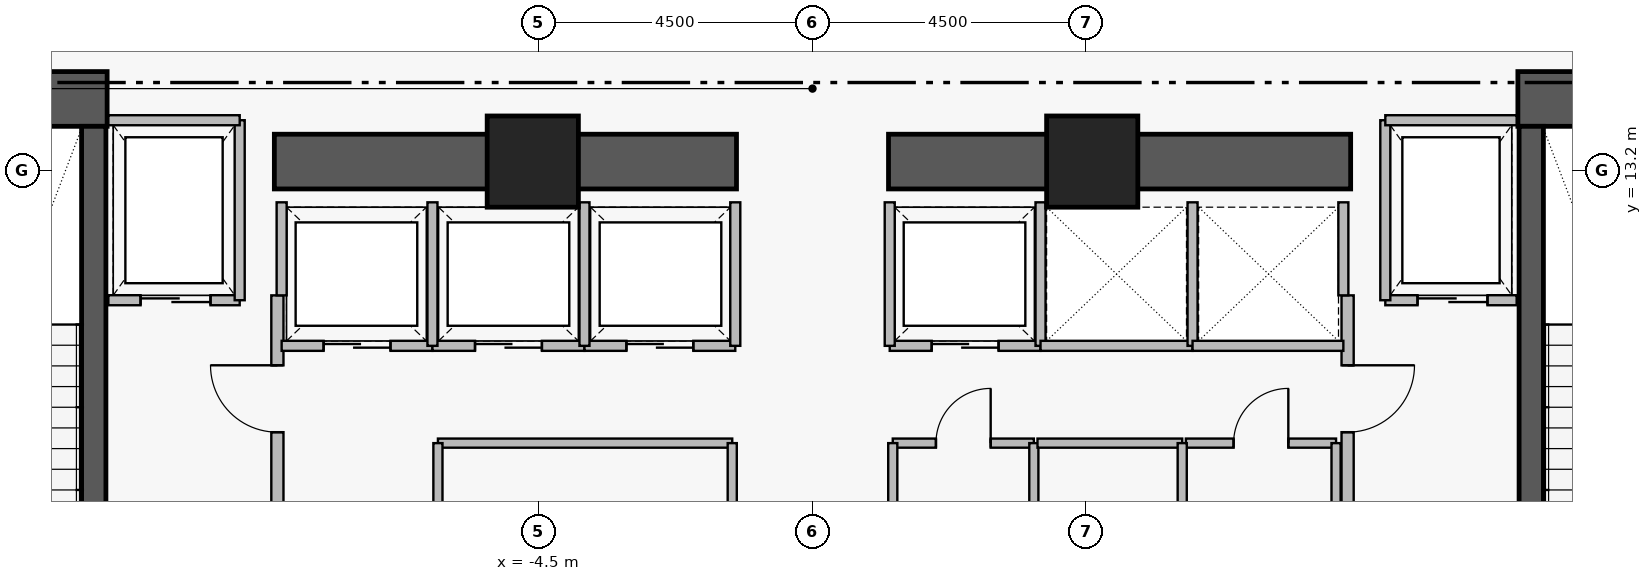
"""IFC4 building model, lengths in metres.
Left out: names, types, materials, properties, quantities, classifications, styles, units other than length and angle.
Written with IfcOpenShell. Run it as: python <this file> out.ifc"""

import sys

from ifc_helpers import new_model, si_unit, direction, frame, frame_2d, origin, origin_2d, place, context, subcontext, project, spatial, rectangle, extrude, element, fill, save


model = new_model("IFC4")
c1 = context("Model", 3, precision=1e-05, world=origin(), true_north=direction((0.0, 1.0)))
c2 = subcontext(c1, "Body", "Model", "MODEL_VIEW")
j1 = project(units=[si_unit("LENGTHUNIT", "METRE"), si_unit("PLANEANGLEUNIT", "RADIAN")], contexts=[c1])
p1 = place(None, origin())
s1 = spatial("IfcSite", under=j1, at=p1, CompositionType="ELEMENT")
p2 = place(p1, origin())
s2 = spatial("IfcBuilding", under=s1, at=p2, CompositionType="ELEMENT")
p3 = place(p2, frame((0.0, 0.0, 22.8)))
s3 = spatial("IfcBuildingStorey", under=s2, at=p3, CompositionType="ELEMENT", Elevation=22.8)
for number, where, z_axis, x_axis in (
    (1, (-16.31, 14.38, 0.0), (0.0, 0.0, 1.0), (1.0, 0.0, 0.0)),
    (2, (11.6, 14.38, 0.0), (0.0, 0.0, 1.0), (1.0, 0.0, 0.0)),
):
    element("IfcWall", number, at=place(p3, frame(where, z_axis=z_axis, x_axis=x_axis)), inside=s3, PredefinedType="SHEAR", context=c2, shape_type="SweptSolid", body=[
        extrude(rectangle(XDim=4.71, YDim=0.9, at=frame_2d((2.355, 0.0))), origin(), (0.0, 0.0, 1.0), 4.61),
    ])
for number, where, z_axis, x_axis in (
    (3, (-8.85, 13.35, 0.0), (0.0, 0.0, 1.0), (1.0, 0.0, 0.0)),
    (4, (1.25, 13.35, 0.0), (0.0, 0.0, 1.0), (1.0, 0.0, 0.0)),
):
    element("IfcWall", number, at=place(p3, frame(where, z_axis=z_axis, x_axis=x_axis)), inside=s3, PredefinedType="SHEAR", context=c2, shape_type="SweptSolid", body=[
        extrude(rectangle(XDim=7.6, YDim=0.9, at=frame_2d((3.8, 0.0))), origin(), (0.0, 0.0, 1.0), 4.58),
    ])
p4 = place(p3, frame((-11.82, 4.97, 0.0), z_axis=(0.0, 0.0, 1.0), x_axis=(0.0, 1.0, 0.0)))
e5 = element("IfcWall", 5, at=p4, inside=s3, PredefinedType="SHEAR", context=c2, shape_type="SweptSolid", body=[
    extrude(rectangle(XDim=8.96, YDim=0.4, at=frame_2d((4.48, 0.0))), origin(), (0.0, 0.0, 1.0), 4.61),
])
p5 = place(p4, frame((0.31, 0.0, 0.0)))
e6 = element("IfcOpeningElement", 6, at=p5, cuts=e5, PredefinedType="OPENING", context=c2, shape_type="SweptSolid", body=[
    extrude(rectangle(XDim=1.12, YDim=2.22, at=frame_2d((0.56, 1.11))), frame((0.0, 0.21, 0.0), z_axis=(0.0, -1.0, 0.0), x_axis=(1.0, 0.0, 0.0)), (0.0, 0.0, 1.0), 0.42),
])
p6 = place(p3, frame((11.82, 13.93, 0.0), z_axis=(0.0, 0.0, 1.0), x_axis=(0.0, -1.0, 0.0)))
e7 = element("IfcWall", 7, at=p6, inside=s3, PredefinedType="SHEAR", context=c2, shape_type="SweptSolid", body=[
    extrude(rectangle(XDim=8.96, YDim=0.4, at=frame_2d((4.48, 0.0))), origin(), (0.0, 0.0, 1.0), 4.61),
])
p7 = place(p6, frame((7.53, 0.0, 0.0)))
e8 = element("IfcOpeningElement", 8, at=p7, cuts=e7, PredefinedType="OPENING", context=c2, shape_type="SweptSolid", body=[
    extrude(rectangle(XDim=1.12, YDim=2.22, at=frame_2d((0.56, 1.11))), frame((0.0, 0.21, 0.0), z_axis=(0.0, -1.0, 0.0), x_axis=(1.0, 0.0, 0.0)), (0.0, 0.0, 1.0), 0.42),
])
for number, where, z_axis, x_axis in (
    (9, (-4.6, 13.35, 0.0), (0.0, 0.0, 1.0), (1.0, 0.0, 0.0)),
    (10, (4.6, 13.35, 0.0), (0.0, 0.0, 1.0), (1.0, 0.0, 0.0)),
):
    element("IfcColumn", number, at=place(p3, frame(where, z_axis=z_axis, x_axis=x_axis)), inside=s3, PredefinedType="COLUMN", context=c2, shape_type="SweptSolid", body=[
        extrude(rectangle(XDim=1.5, YDim=1.5, at=origin_2d()), origin(), (0.0, 0.0, 1.0), 4.8),
    ])
p8 = place(p3, frame((-8.8, 5.05, 0.0), z_axis=(0.0, 0.0, 1.0), x_axis=(0.0, 1.0, 0.0)))
e11 = element("IfcWall", 11, at=p8, inside=s3, PredefinedType="PARTITIONING", context=c2, shape_type="SweptSolid", body=[
    extrude(rectangle(XDim=6.1, YDim=0.2, at=frame_2d((3.05, 0.0))), origin(), (0.0, 0.0, 1.0), 4.58),
])
p9 = place(p8, frame((0.25, 0.0, 0.0)))
e12 = element("IfcOpeningElement", 12, at=p9, cuts=e11, PredefinedType="OPENING", context=c2, shape_type="SweptSolid", body=[
    extrude(rectangle(XDim=1.1, YDim=2.2, at=frame_2d((0.55, 1.1))), frame((0.0, 0.11, 0.0), z_axis=(0.0, -1.0, 0.0), x_axis=(1.0, 0.0, 0.0)), (0.0, 0.0, 1.0), 0.22),
])
p10 = place(p8, frame((3.85, 0.0, 0.0)))
e13 = element("IfcOpeningElement", 13, at=p10, cuts=e11, PredefinedType="OPENING", context=c2, shape_type="SweptSolid", body=[
    extrude(rectangle(XDim=1.1, YDim=2.2, at=frame_2d((0.55, 1.1))), frame((0.0, 0.11, 0.0), z_axis=(0.0, -1.0, 0.0), x_axis=(1.0, 0.0, 0.0)), (0.0, 0.0, 1.0), 0.22),
])
p11 = place(p3, frame((8.8, 11.15, 0.0), z_axis=(0.0, 0.0, 1.0), x_axis=(0.0, -1.0, 0.0)))
e14 = element("IfcWall", 14, at=p11, inside=s3, PredefinedType="PARTITIONING", context=c2, shape_type="SweptSolid", body=[
    extrude(rectangle(XDim=6.1, YDim=0.2, at=frame_2d((3.05, 0.0))), origin(), (0.0, 0.0, 1.0), 4.58),
])
p12 = place(p11, frame((1.15, 0.0, 0.0)))
e15 = element("IfcOpeningElement", 15, at=p12, cuts=e14, PredefinedType="OPENING", context=c2, shape_type="SweptSolid", body=[
    extrude(rectangle(XDim=1.1, YDim=2.2, at=frame_2d((0.55, 1.1))), frame((0.0, 0.11, 0.0), z_axis=(0.0, -1.0, 0.0), x_axis=(1.0, 0.0, 0.0)), (0.0, 0.0, 1.0), 0.22),
])
p13 = place(p11, frame((4.75, 0.0, 0.0)))
e16 = element("IfcOpeningElement", 16, at=p13, cuts=e14, PredefinedType="OPENING", context=c2, shape_type="SweptSolid", body=[
    extrude(rectangle(XDim=1.1, YDim=2.2, at=frame_2d((0.55, 1.1))), frame((0.0, 0.11, 0.0), z_axis=(0.0, -1.0, 0.0), x_axis=(1.0, 0.0, 0.0)), (0.0, 0.0, 1.0), 0.22),
])
p14 = place(p3, frame((-11.58, 11.07, 0.0), z_axis=(0.0, 0.0, 1.0), x_axis=(1.0, 0.0, 0.0)))
e17 = element("IfcWall", 17, at=p14, inside=s3, PredefinedType="PARTITIONING", context=c2, shape_type="SweptSolid", body=[
    extrude(rectangle(XDim=2.16, YDim=0.165, at=frame_2d((1.08, 0.0))), origin(), (0.0, 0.0, 1.0), 4.58),
])
p15 = place(p14, frame((0.53, 0.0, 0.0)))
e18 = element("IfcOpeningElement", 18, at=p15, cuts=e17, PredefinedType="OPENING", context=c2, shape_type="SweptSolid", body=[
    extrude(rectangle(XDim=1.15, YDim=2.25, at=frame_2d((0.575, 1.125))), frame((0.0, 0.093, 0.0), z_axis=(0.0, -1.0, 0.0), x_axis=(1.0, 0.0, 0.0)), (0.0, 0.0, 1.0), 0.185),
])
p16 = place(p3, frame((9.42, 11.07, 0.0), z_axis=(0.0, 0.0, 1.0), x_axis=(1.0, 0.0, 0.0)))
e19 = element("IfcWall", 19, at=p16, inside=s3, PredefinedType="PARTITIONING", context=c2, shape_type="SweptSolid", body=[
    extrude(rectangle(XDim=2.16, YDim=0.165, at=frame_2d((1.08, 0.0))), origin(), (0.0, 0.0, 1.0), 4.58),
])
p17 = place(p16, frame((0.53, 0.0, 0.0)))
e20 = element("IfcOpeningElement", 20, at=p17, cuts=e19, PredefinedType="OPENING", context=c2, shape_type="SweptSolid", body=[
    extrude(rectangle(XDim=1.15, YDim=2.25, at=frame_2d((0.575, 1.125))), frame((0.0, 0.093, 0.0), z_axis=(0.0, -1.0, 0.0), x_axis=(1.0, 0.0, 0.0)), (0.0, 0.0, 1.0), 0.185),
])
p18 = place(p3, frame((-8.73, 10.32, 0.0), z_axis=(0.0, 0.0, 1.0), x_axis=(1.0, 0.0, 0.0)))
e21 = element("IfcWall", 21, at=p18, inside=s3, PredefinedType="PARTITIONING", context=c2, shape_type="SweptSolid", body=[
    extrude(rectangle(XDim=2.48, YDim=0.165, at=frame_2d((1.24, 0.0))), origin(), (0.0, 0.0, 1.0), 4.58),
])
p19 = place(p18, frame((0.69, 0.0, 0.0)))
e22 = element("IfcOpeningElement", 22, at=p19, cuts=e21, PredefinedType="OPENING", context=c2, shape_type="SweptSolid", body=[
    extrude(rectangle(XDim=1.1, YDim=2.25, at=frame_2d((0.55, 1.125))), frame((0.0, 0.093, 0.0), z_axis=(0.0, -1.0, 0.0), x_axis=(1.0, 0.0, 0.0)), (0.0, 0.0, 1.0), 0.185),
])
p20 = place(p3, frame((-6.25, 10.32, 0.0), z_axis=(0.0, 0.0, 1.0), x_axis=(1.0, 0.0, 0.0)))
e23 = element("IfcWall", 23, at=p20, inside=s3, PredefinedType="PARTITIONING", context=c2, shape_type="SweptSolid", body=[
    extrude(rectangle(XDim=2.5, YDim=0.165, at=frame_2d((1.25, 0.0))), origin(), (0.0, 0.0, 1.0), 4.58),
])
p21 = place(p20, frame((0.7, 0.0, 0.0)))
e24 = element("IfcOpeningElement", 24, at=p21, cuts=e23, PredefinedType="OPENING", context=c2, shape_type="SweptSolid", body=[
    extrude(rectangle(XDim=1.1, YDim=2.25, at=frame_2d((0.55, 1.125))), frame((0.0, 0.093, 0.0), z_axis=(0.0, -1.0, 0.0), x_axis=(1.0, 0.0, 0.0)), (0.0, 0.0, 1.0), 0.185),
])
p22 = place(p3, frame((-3.75, 10.32, 0.0), z_axis=(0.0, 0.0, 1.0), x_axis=(1.0, 0.0, 0.0)))
e25 = element("IfcWall", 25, at=p22, inside=s3, PredefinedType="PARTITIONING", context=c2, shape_type="SweptSolid", body=[
    extrude(rectangle(XDim=2.48, YDim=0.165, at=frame_2d((1.24, 0.0))), origin(), (0.0, 0.0, 1.0), 4.58),
])
p23 = place(p22, frame((0.69, 0.0, 0.0)))
e26 = element("IfcOpeningElement", 26, at=p23, cuts=e25, PredefinedType="OPENING", context=c2, shape_type="SweptSolid", body=[
    extrude(rectangle(XDim=1.1, YDim=2.25, at=frame_2d((0.55, 1.125))), frame((0.0, 0.093, 0.0), z_axis=(0.0, -1.0, 0.0), x_axis=(1.0, 0.0, 0.0)), (0.0, 0.0, 1.0), 0.185),
])
p24 = place(p3, frame((1.27, 10.32, 0.0), z_axis=(0.0, 0.0, 1.0), x_axis=(1.0, 0.0, 0.0)))
e27 = element("IfcWall", 27, at=p24, inside=s3, PredefinedType="PARTITIONING", context=c2, shape_type="SweptSolid", body=[
    extrude(rectangle(XDim=2.48, YDim=0.165, at=frame_2d((1.24, 0.0))), origin(), (0.0, 0.0, 1.0), 4.58),
])
p25 = place(p24, frame((0.69, 0.0, 0.0)))
e28 = element("IfcOpeningElement", 28, at=p25, cuts=e27, PredefinedType="OPENING", context=c2, shape_type="SweptSolid", body=[
    extrude(rectangle(XDim=1.1, YDim=2.25, at=frame_2d((0.55, 1.125))), frame((0.0, 0.093, 0.0), z_axis=(0.0, -1.0, 0.0), x_axis=(1.0, 0.0, 0.0)), (0.0, 0.0, 1.0), 0.185),
])
p26 = place(p3, frame((1.32, 8.72, 0.0), z_axis=(0.0, 0.0, 1.0), x_axis=(1.0, 0.0, 0.0)))
e29 = element("IfcWall", 29, at=p26, inside=s3, PredefinedType="PARTITIONING", context=c2, shape_type="SweptSolid", body=[
    extrude(rectangle(XDim=2.32, YDim=0.15, at=frame_2d((1.16, 0.0))), origin(), (0.0, 0.0, 1.0), 4.58),
])
p27 = place(p26, frame((0.71, 0.0, 0.0)))
e30 = element("IfcOpeningElement", 30, at=p27, cuts=e29, PredefinedType="OPENING", context=c2, shape_type="SweptSolid", body=[
    extrude(rectangle(XDim=0.9, YDim=2.15, at=frame_2d((0.45, 1.075))), frame((0.0, 0.085, 0.0), z_axis=(0.0, -1.0, 0.0), x_axis=(1.0, 0.0, 0.0)), (0.0, 0.0, 1.0), 0.17),
])
p28 = place(p3, frame((6.14, 8.72, 0.0), z_axis=(0.0, 0.0, 1.0), x_axis=(1.0, 0.0, 0.0)))
e31 = element("IfcWall", 31, at=p28, inside=s3, PredefinedType="PARTITIONING", context=c2, shape_type="SweptSolid", body=[
    extrude(rectangle(XDim=2.47, YDim=0.15, at=frame_2d((1.235, 0.0))), origin(), (0.0, 0.0, 1.0), 4.58),
])
p29 = place(p28, frame((0.785, 0.0, 0.0)))
e32 = element("IfcOpeningElement", 32, at=p29, cuts=e31, PredefinedType="OPENING", context=c2, shape_type="SweptSolid", body=[
    extrude(rectangle(XDim=0.9, YDim=2.15, at=frame_2d((0.45, 1.075))), frame((0.0, 0.085, 0.0), z_axis=(0.0, -1.0, 0.0), x_axis=(1.0, 0.0, 0.0)), (0.0, 0.0, 1.0), 0.17),
])
p30 = place(p3, frame((-9.42, 11.07, 0.0), z_axis=(0.0, 0.0, 1.0), x_axis=(0.0, 1.0, 0.0)))
e33 = element("IfcWall", 33, at=p30, inside=s3, PredefinedType="PARTITIONING", context=c2, shape_type="SweptSolid", body=[
    extrude(rectangle(XDim=2.96, YDim=0.165, at=frame_2d((1.48, 0.0))), origin(), (0.0, 0.0, 1.0), 4.58),
])
p31 = place(p3, frame((-11.58, 14.03, 0.0), z_axis=(0.0, 0.0, 1.0), x_axis=(1.0, 0.0, 0.0)))
e34 = element("IfcWall", 34, at=p31, inside=s3, PredefinedType="PARTITIONING", context=c2, shape_type="SweptSolid", body=[
    extrude(rectangle(XDim=2.16, YDim=0.165, at=frame_2d((1.08, 0.0))), origin(), (0.0, 0.0, 1.0), 4.58),
])
p32 = place(p3, frame((9.42, 11.07, 0.0), z_axis=(0.0, 0.0, 1.0), x_axis=(0.0, 1.0, 0.0)))
e35 = element("IfcWall", 35, at=p32, inside=s3, PredefinedType="PARTITIONING", context=c2, shape_type="SweptSolid", body=[
    extrude(rectangle(XDim=2.96, YDim=0.165, at=frame_2d((1.48, 0.0))), origin(), (0.0, 0.0, 1.0), 4.58),
])
p33 = place(p3, frame((9.42, 14.03, 0.0), z_axis=(0.0, 0.0, 1.0), x_axis=(1.0, 0.0, 0.0)))
e36 = element("IfcWall", 36, at=p33, inside=s3, PredefinedType="PARTITIONING", context=c2, shape_type="SweptSolid", body=[
    extrude(rectangle(XDim=2.16, YDim=0.165, at=frame_2d((1.08, 0.0))), origin(), (0.0, 0.0, 1.0), 4.58),
])
p34 = place(p3, frame((-8.73, 11.15, 0.0), z_axis=(0.0, 0.0, 1.0), x_axis=(0.0, 1.0, 0.0)))
e37 = element("IfcWall", 37, at=p34, inside=s3, PredefinedType="PARTITIONING", context=c2, shape_type="SweptSolid", body=[
    extrude(rectangle(XDim=1.53, YDim=0.165, at=frame_2d((0.765, 0.0))), origin(), (0.0, 0.0, 1.0), 4.58),
])
for number, where, z_axis, x_axis in (
    (38, (-6.25, 10.32, 0.0), (0.0, 0.0, 1.0), (0.0, 1.0, 0.0)),
    (39, (-3.75, 10.32, 0.0), (0.0, 0.0, 1.0), (0.0, 1.0, 0.0)),
    (40, (-1.27, 10.32, 0.0), (0.0, 0.0, 1.0), (0.0, 1.0, 0.0)),
    (41, (1.27, 10.32, 0.0), (0.0, 0.0, 1.0), (0.0, 1.0, 0.0)),
    (42, (3.75, 10.32, 0.0), (0.0, 0.0, 1.0), (0.0, 1.0, 0.0)),
):
    element("IfcWall", number, at=place(p3, frame(where, z_axis=z_axis, x_axis=x_axis)), inside=s3, PredefinedType="PARTITIONING", context=c2, shape_type="SweptSolid", body=[
        extrude(rectangle(XDim=2.36, YDim=0.165, at=frame_2d((1.18, 0.0))), origin(), (0.0, 0.0, 1.0), 4.58),
    ])
p35 = place(p3, frame((3.75, 10.32, 0.0), z_axis=(0.0, 0.0, 1.0), x_axis=(1.0, 0.0, 0.0)))
e43 = element("IfcWall", 43, at=p35, inside=s3, PredefinedType="PARTITIONING", context=c2, shape_type="SweptSolid", body=[
    extrude(rectangle(XDim=2.5, YDim=0.165, at=frame_2d((1.25, 0.0))), origin(), (0.0, 0.0, 1.0), 4.58),
])
p36 = place(p3, frame((6.25, 10.32, 0.0), z_axis=(0.0, 0.0, 1.0), x_axis=(0.0, 1.0, 0.0)))
e44 = element("IfcWall", 44, at=p36, inside=s3, PredefinedType="PARTITIONING", context=c2, shape_type="SweptSolid", body=[
    extrude(rectangle(XDim=2.36, YDim=0.165, at=frame_2d((1.18, 0.0))), origin(), (0.0, 0.0, 1.0), 4.58),
])
p37 = place(p3, frame((6.25, 10.32, 0.0), z_axis=(0.0, 0.0, 1.0), x_axis=(1.0, 0.0, 0.0)))
e45 = element("IfcWall", 45, at=p37, inside=s3, PredefinedType="PARTITIONING", context=c2, shape_type="SweptSolid", body=[
    extrude(rectangle(XDim=2.48, YDim=0.165, at=frame_2d((1.24, 0.0))), origin(), (0.0, 0.0, 1.0), 4.58),
])
p38 = place(p3, frame((8.73, 11.15, 0.0), z_axis=(0.0, 0.0, 1.0), x_axis=(0.0, 1.0, 0.0)))
e46 = element("IfcWall", 46, at=p38, inside=s3, PredefinedType="PARTITIONING", context=c2, shape_type="SweptSolid", body=[
    extrude(rectangle(XDim=1.53, YDim=0.165, at=frame_2d((0.765, 0.0))), origin(), (0.0, 0.0, 1.0), 4.58),
])
p39 = place(p3, frame((-6.16, 8.72, 0.0), z_axis=(0.0, 0.0, 1.0), x_axis=(1.0, 0.0, 0.0)))
e47 = element("IfcWall", 47, at=p39, inside=s3, PredefinedType="PARTITIONING", context=c2, shape_type="SweptSolid", body=[
    extrude(rectangle(XDim=4.84, YDim=0.15, at=frame_2d((2.42, 0.0))), origin(), (0.0, 0.0, 1.0), 4.58),
])
for number, where, z_axis, x_axis in (
    (48, (-6.16, 6.48, 0.0), (0.0, 0.0, 1.0), (0.0, 1.0, 0.0)),
    (49, (-1.32, 6.48, 0.0), (0.0, 0.0, 1.0), (0.0, 1.0, 0.0)),
    (50, (1.32, 6.48, 0.0), (0.0, 0.0, 1.0), (0.0, 1.0, 0.0)),
    (51, (3.64, 6.48, 0.0), (0.0, 0.0, 1.0), (0.0, 1.0, 0.0)),
):
    element("IfcWall", number, at=place(p3, frame(where, z_axis=z_axis, x_axis=x_axis)), inside=s3, PredefinedType="PARTITIONING", context=c2, shape_type="SweptSolid", body=[
        extrude(rectangle(XDim=2.24, YDim=0.15, at=frame_2d((1.12, 0.0))), origin(), (0.0, 0.0, 1.0), 4.58),
    ])
p40 = place(p3, frame((3.7, 8.72, 0.0), z_axis=(0.0, 0.0, 1.0), x_axis=(1.0, 0.0, 0.0)))
e52 = element("IfcWall", 52, at=p40, inside=s3, PredefinedType="PARTITIONING", context=c2, shape_type="SweptSolid", body=[
    extrude(rectangle(XDim=2.38, YDim=0.15, at=frame_2d((1.19, 0.0))), origin(), (0.0, 0.0, 1.0), 4.58),
])
for number, where, z_axis, x_axis in (
    (53, (6.08, 6.48, 0.0), (0.0, 0.0, 1.0), (0.0, 1.0, 0.0)),
    (54, (8.61, 6.48, 0.0), (0.0, 0.0, 1.0), (0.0, 1.0, 0.0)),
):
    element("IfcWall", number, at=place(p3, frame(where, z_axis=z_axis, x_axis=x_axis)), inside=s3, PredefinedType="PARTITIONING", context=c2, shape_type="SweptSolid", body=[
        extrude(rectangle(XDim=2.24, YDim=0.15, at=frame_2d((1.12, 0.0))), origin(), (0.0, 0.0, 1.0), 4.58),
    ])
p41 = place(p10, origin())
e55 = element("IfcDoor", 55, at=p41, inside=s3, OperationType="SINGLE_SWING_RIGHT", PredefinedType="DOOR", context=c2, shape_type="SweptSolid", body=[
    extrude(rectangle(XDim=1.1, YDim=2.2, at=frame_2d((0.55, 1.1))), frame((0.0, 0.025, 0.0), z_axis=(0.0, -1.0, 0.0), x_axis=(1.0, 0.0, 0.0)), (0.0, 0.0, 1.0), 0.05),
])
fill(e13, e55)
p42 = place(p12, origin())
e56 = element("IfcDoor", 56, at=p42, inside=s3, OperationType="SINGLE_SWING_LEFT", PredefinedType="DOOR", context=c2, shape_type="SweptSolid", body=[
    extrude(rectangle(XDim=1.1, YDim=2.2, at=frame_2d((0.55, 1.1))), frame((0.0, 0.025, 0.0), z_axis=(0.0, -1.0, 0.0), x_axis=(1.0, 0.0, 0.0)), (0.0, 0.0, 1.0), 0.05),
])
fill(e15, e56)
p43 = place(p15, origin())
e57 = element("IfcDoor", 57, at=p43, inside=s3, OperationType="SLIDING_TO_LEFT", PredefinedType="DOOR", context=c2, shape_type="SweptSolid", body=[
    extrude(rectangle(XDim=1.15, YDim=2.25, at=frame_2d((0.575, 1.125))), frame((0.0, 0.025, 0.0), z_axis=(0.0, -1.0, 0.0), x_axis=(1.0, 0.0, 0.0)), (0.0, 0.0, 1.0), 0.05),
])
fill(e18, e57)
p44 = place(p17, origin())
e58 = element("IfcDoor", 58, at=p44, inside=s3, OperationType="SLIDING_TO_LEFT", PredefinedType="DOOR", context=c2, shape_type="SweptSolid", body=[
    extrude(rectangle(XDim=1.15, YDim=2.25, at=frame_2d((0.575, 1.125))), frame((0.0, 0.025, 0.0), z_axis=(0.0, -1.0, 0.0), x_axis=(1.0, 0.0, 0.0)), (0.0, 0.0, 1.0), 0.05),
])
fill(e20, e58)
p45 = place(p19, origin())
e59 = element("IfcDoor", 59, at=p45, inside=s3, OperationType="SLIDING_TO_LEFT", PredefinedType="DOOR", context=c2, shape_type="SweptSolid", body=[
    extrude(rectangle(XDim=1.1, YDim=2.25, at=frame_2d((0.55, 1.125))), frame((0.0, 0.025, 0.0), z_axis=(0.0, -1.0, 0.0), x_axis=(1.0, 0.0, 0.0)), (0.0, 0.0, 1.0), 0.05),
])
fill(e22, e59)
p46 = place(p21, origin())
e60 = element("IfcDoor", 60, at=p46, inside=s3, OperationType="SLIDING_TO_LEFT", PredefinedType="DOOR", context=c2, shape_type="SweptSolid", body=[
    extrude(rectangle(XDim=1.1, YDim=2.25, at=frame_2d((0.55, 1.125))), frame((0.0, 0.025, 0.0), z_axis=(0.0, -1.0, 0.0), x_axis=(1.0, 0.0, 0.0)), (0.0, 0.0, 1.0), 0.05),
])
fill(e24, e60)
p47 = place(p23, origin())
e61 = element("IfcDoor", 61, at=p47, inside=s3, OperationType="SLIDING_TO_LEFT", PredefinedType="DOOR", context=c2, shape_type="SweptSolid", body=[
    extrude(rectangle(XDim=1.1, YDim=2.25, at=frame_2d((0.55, 1.125))), frame((0.0, 0.025, 0.0), z_axis=(0.0, -1.0, 0.0), x_axis=(1.0, 0.0, 0.0)), (0.0, 0.0, 1.0), 0.05),
])
fill(e26, e61)
p48 = place(p25, origin())
e62 = element("IfcDoor", 62, at=p48, inside=s3, OperationType="SLIDING_TO_LEFT", PredefinedType="DOOR", context=c2, shape_type="SweptSolid", body=[
    extrude(rectangle(XDim=1.1, YDim=2.25, at=frame_2d((0.55, 1.125))), frame((0.0, 0.025, 0.0), z_axis=(0.0, -1.0, 0.0), x_axis=(1.0, 0.0, 0.0)), (0.0, 0.0, 1.0), 0.05),
])
fill(e28, e62)
p49 = place(p27, origin())
e63 = element("IfcDoor", 63, at=p49, inside=s3, OperationType="SINGLE_SWING_RIGHT", PredefinedType="DOOR", context=c2, shape_type="SweptSolid", body=[
    extrude(rectangle(XDim=0.9, YDim=2.15, at=frame_2d((0.45, 1.075))), frame((0.0, 0.025, 0.0), z_axis=(0.0, -1.0, 0.0), x_axis=(1.0, 0.0, 0.0)), (0.0, 0.0, 1.0), 0.05),
])
fill(e30, e63)
p50 = place(p29, origin())
e64 = element("IfcDoor", 64, at=p50, inside=s3, OperationType="SINGLE_SWING_RIGHT", PredefinedType="DOOR", context=c2, shape_type="SweptSolid", body=[
    extrude(rectangle(XDim=0.9, YDim=2.15, at=frame_2d((0.45, 1.075))), frame((0.0, 0.025, 0.0), z_axis=(0.0, -1.0, 0.0), x_axis=(1.0, 0.0, 0.0)), (0.0, 0.0, 1.0), 0.05),
])
fill(e32, e64)
save(model, sys.argv[1])
